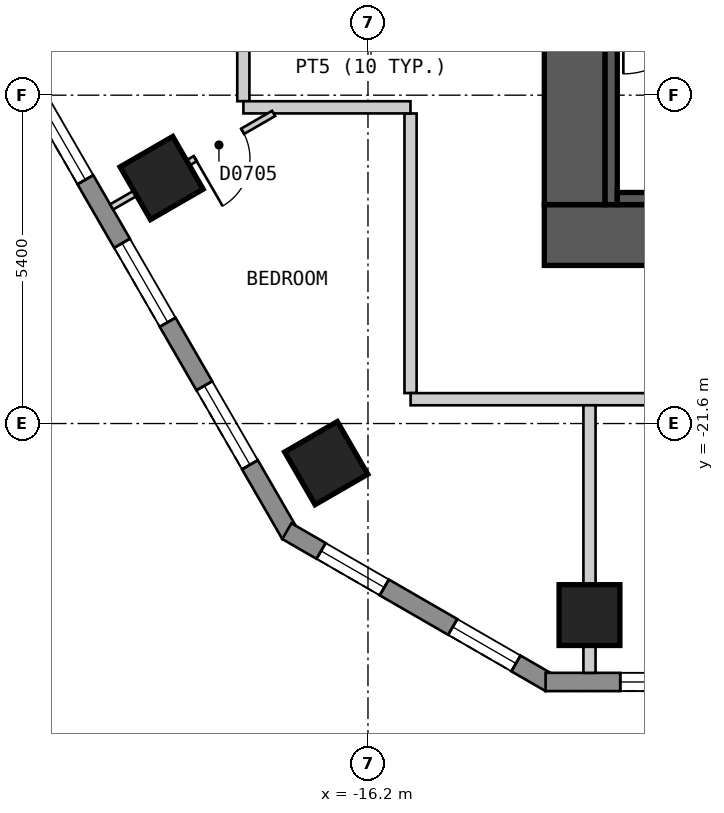
"""IFC4 building model, lengths in metres.
Left out: names, types, materials, properties, quantities, classifications, styles, units other than length and angle.
Written with IfcOpenShell. Run it as: python <this file> out.ifc"""

import sys

from ifc_helpers import new_model, si_unit, direction, frame, frame_2d, origin, origin_2d, place, context, subcontext, project, spatial, polyline, rectangle, outline, extrude, element, fill, save


model = new_model("IFC4")
c1 = context("Model", 3, precision=1e-05, world=origin(), true_north=direction((0.0, 1.0)))
c2 = subcontext(c1, "Body", "Model", "MODEL_VIEW")
j1 = project(units=[si_unit("LENGTHUNIT", "METRE"), si_unit("PLANEANGLEUNIT", "RADIAN")], contexts=[c1])
p1 = place(None, origin())
s1 = spatial("IfcSite", under=j1, at=p1, CompositionType="ELEMENT")
p2 = place(p1, origin())
s2 = spatial("IfcBuilding", under=s1, at=p2, CompositionType="ELEMENT")
p3 = place(p2, frame((0.0, 0.0, 93.0)))
s3 = spatial("IfcBuildingStorey", under=s2, at=p3, CompositionType="ELEMENT", Elevation=93.0)
for number, where, z_axis, x_axis in (
    (1, (-19.594, -17.563, 0.0), (0.0, 0.0, 1.0), (0.5, -0.866, 0.0)),
    (2, (-16.887, -22.251, 0.0), (0.0, 0.0, 1.0), (0.5, -0.866, 0.0)),
    (3, (-12.557, -24.75, 0.0), (0.0, 0.0, 1.0), (1.0, 0.0, 0.0)),
):
    element("IfcColumn", number, at=place(p3, frame(where, z_axis=z_axis, x_axis=x_axis)), inside=s3, PredefinedType="COLUMN", context=c2, shape_type="SweptSolid", body=[
        extrude(rectangle(XDim=1.0, YDim=1.0, at=origin_2d()), origin(), (0.0, 0.0, 1.0), 3.0),
    ])
p4 = place(p3, frame((-13.3, -18.5, 0.0), z_axis=(0.0, 0.0, 1.0), x_axis=(1.0, 0.0, 0.0)))
e4 = element("IfcWall", 4, at=p4, inside=s3, PredefinedType="SHEAR", context=c2, shape_type="SweptSolid", body=[
    extrude(rectangle(XDim=26.6, YDim=1.0, at=frame_2d((13.3, 0.0))), origin(), (0.0, 0.0, 1.0), 2.7),
])
p5 = place(p3, frame((-12.8, -18.0, 0.0), z_axis=(0.0, 0.0, 1.0), x_axis=(0.0, 1.0, 0.0)))
e5 = element("IfcWall", 5, at=p5, inside=s3, PredefinedType="SHEAR", context=c2, shape_type="SweptSolid", body=[
    extrude(rectangle(XDim=12.0, YDim=1.0, at=frame_2d((6.0, 0.0))), origin(), (0.0, 0.0, 1.0), 2.7),
])
p6 = place(p5, frame((3.8, 0.0, 0.0)))
e6 = element("IfcOpeningElement", 6, at=p6, cuts=e5, PredefinedType="OPENING", context=c2, shape_type="SweptSolid", body=[
    extrude(rectangle(XDim=1.2, YDim=2.1, at=frame_2d((0.6, 1.05))), frame((0.0, 0.51, 0.0), z_axis=(0.0, -1.0, 0.0), x_axis=(1.0, 0.0, 0.0)), (0.0, 0.0, 1.0), 1.02),
])
p7 = place(p3, frame((-29.027, -3.425, 0.0), z_axis=(0.0, 0.0, 1.0), x_axis=(0.500035407905, -0.866004960056, 0.0)))
e7 = element("IfcWall", 7, at=p7, inside=s3, PredefinedType="SOLIDWALL", context=c2, shape_type="SweptSolid", body=[
    extrude(outline(polyline([(0.0, -0.15), (23.094, -0.15), (23.014, 0.15), (0.08, 0.15), (0.0, -0.15)])), origin(), (0.0, 0.0, 1.0), 2.7),
])
p8 = place(p7, frame((1.324, 0.0, 0.15)))
e8 = element("IfcOpeningElement", 8, at=p8, cuts=e7, PredefinedType="OPENING", context=c2, shape_type="SweptSolid", body=[
    extrude(rectangle(XDim=1.5, YDim=2.1, at=frame_2d((0.75, 1.05))), frame((0.0, 0.16, 0.0), z_axis=(0.0, -1.0, 0.0), x_axis=(1.0, 0.0, 0.0)), (0.0, 0.0, 1.0), 0.32),
])
p9 = place(p7, frame((4.031, 0.0, 0.15)))
e9 = element("IfcOpeningElement", 9, at=p9, cuts=e7, PredefinedType="OPENING", context=c2, shape_type="SweptSolid", body=[
    extrude(rectangle(XDim=1.5, YDim=2.1, at=frame_2d((0.75, 1.05))), frame((0.0, 0.16, 0.0), z_axis=(0.0, -1.0, 0.0), x_axis=(1.0, 0.0, 0.0)), (0.0, 0.0, 1.0), 0.32),
])
p10 = place(p7, frame((6.737, 0.0, 0.15)))
e10 = element("IfcOpeningElement", 10, at=p10, cuts=e7, PredefinedType="OPENING", context=c2, shape_type="SweptSolid", body=[
    extrude(rectangle(XDim=1.5, YDim=2.1, at=frame_2d((0.75, 1.05))), frame((0.0, 0.16, 0.0), z_axis=(0.0, -1.0, 0.0), x_axis=(1.0, 0.0, 0.0)), (0.0, 0.0, 1.0), 0.32),
])
p11 = place(p7, frame((9.444, 0.0, 0.15)))
e11 = element("IfcOpeningElement", 11, at=p11, cuts=e7, PredefinedType="OPENING", context=c2, shape_type="SweptSolid", body=[
    extrude(rectangle(XDim=1.5, YDim=2.1, at=frame_2d((0.75, 1.05))), frame((0.0, 0.16, 0.0), z_axis=(0.0, -1.0, 0.0), x_axis=(1.0, 0.0, 0.0)), (0.0, 0.0, 1.0), 0.32),
])
p12 = place(p7, frame((12.151, 0.0, 0.15)))
e12 = element("IfcOpeningElement", 12, at=p12, cuts=e7, PredefinedType="OPENING", context=c2, shape_type="SweptSolid", body=[
    extrude(rectangle(XDim=1.5, YDim=2.1, at=frame_2d((0.75, 1.05))), frame((0.0, 0.16, 0.0), z_axis=(0.0, -1.0, 0.0), x_axis=(1.0, 0.0, 0.0)), (0.0, 0.0, 1.0), 0.32),
])
p13 = place(p7, frame((14.857, 0.0, 0.15)))
e13 = element("IfcOpeningElement", 13, at=p13, cuts=e7, PredefinedType="OPENING", context=c2, shape_type="SweptSolid", body=[
    extrude(rectangle(XDim=1.5, YDim=2.1, at=frame_2d((0.75, 1.05))), frame((0.0, 0.16, 0.0), z_axis=(0.0, -1.0, 0.0), x_axis=(1.0, 0.0, 0.0)), (0.0, 0.0, 1.0), 0.32),
])
p14 = place(p7, frame((17.564, 0.0, 0.15)))
e14 = element("IfcOpeningElement", 14, at=p14, cuts=e7, PredefinedType="OPENING", context=c2, shape_type="SweptSolid", body=[
    extrude(rectangle(XDim=1.5, YDim=2.1, at=frame_2d((0.75, 1.05))), frame((0.0, 0.16, 0.0), z_axis=(0.0, -1.0, 0.0), x_axis=(1.0, 0.0, 0.0)), (0.0, 0.0, 1.0), 0.32),
])
p15 = place(p7, frame((20.27, 0.0, 0.15)))
e15 = element("IfcOpeningElement", 15, at=p15, cuts=e7, PredefinedType="OPENING", context=c2, shape_type="SweptSolid", body=[
    extrude(rectangle(XDim=1.5, YDim=2.1, at=frame_2d((0.75, 1.05))), frame((0.0, 0.16, 0.0), z_axis=(0.0, -1.0, 0.0), x_axis=(1.0, 0.0, 0.0)), (0.0, 0.0, 1.0), 0.32),
])
p16 = place(p3, frame((-17.534, -23.37, 0.0), z_axis=(0.0, 0.0, 1.0), x_axis=(0.866010750942, -0.50002537861, 0.0)))
e16 = element("IfcWall", 16, at=p16, inside=s3, PredefinedType="SOLIDWALL", context=c2, shape_type="SweptSolid", body=[
    extrude(outline(polyline([(0.0, -0.15), (5.0, -0.15), (4.919, 0.15), (0.08, 0.15), (0.0, -0.15)])), origin(), (0.0, 0.0, 1.0), 2.7),
])
p17 = place(p16, frame((0.65, 0.0, 0.15)))
e17 = element("IfcOpeningElement", 17, at=p17, cuts=e16, PredefinedType="OPENING", context=c2, shape_type="SweptSolid", body=[
    extrude(rectangle(XDim=1.2, YDim=2.1, at=frame_2d((0.6, 1.05))), frame((0.0, 0.16, 0.0), z_axis=(0.0, -1.0, 0.0), x_axis=(1.0, 0.0, 0.0)), (0.0, 0.0, 1.0), 0.32),
])
p18 = place(p16, frame((3.15, 0.0, 0.15)))
e18 = element("IfcOpeningElement", 18, at=p18, cuts=e16, PredefinedType="OPENING", context=c2, shape_type="SweptSolid", body=[
    extrude(rectangle(XDim=1.2, YDim=2.1, at=frame_2d((0.6, 1.05))), frame((0.0, 0.16, 0.0), z_axis=(0.0, -1.0, 0.0), x_axis=(1.0, 0.0, 0.0)), (0.0, 0.0, 1.0), 0.32),
])
p19 = place(p3, frame((-13.279, -25.85, 0.0), z_axis=(0.0, 0.0, 1.0), x_axis=(1.0, 0.0, 0.0)))
e19 = element("IfcWall", 19, at=p19, inside=s3, PredefinedType="SOLIDWALL", context=c2, shape_type="SweptSolid", body=[
    extrude(outline(polyline([(0.0, -0.15), (26.558, -0.15), (26.478, 0.15), (0.08, 0.15), (0.0, -0.15)])), origin(), (0.0, 0.0, 1.0), 2.7),
])
p20 = place(p19, frame((1.228, 0.0, 0.15)))
e20 = element("IfcOpeningElement", 20, at=p20, cuts=e19, PredefinedType="OPENING", context=c2, shape_type="SweptSolid", body=[
    extrude(rectangle(XDim=1.5, YDim=2.1, at=frame_2d((0.75, 1.05))), frame((0.0, 0.16, 0.0), z_axis=(0.0, -1.0, 0.0), x_axis=(1.0, 0.0, 0.0)), (0.0, 0.0, 1.0), 0.32),
])
p21 = place(p19, frame((3.739, 0.0, 0.15)))
e21 = element("IfcOpeningElement", 21, at=p21, cuts=e19, PredefinedType="OPENING", context=c2, shape_type="SweptSolid", body=[
    extrude(rectangle(XDim=1.5, YDim=2.1, at=frame_2d((0.75, 1.05))), frame((0.0, 0.16, 0.0), z_axis=(0.0, -1.0, 0.0), x_axis=(1.0, 0.0, 0.0)), (0.0, 0.0, 1.0), 0.32),
])
p22 = place(p19, frame((6.251, 0.0, 0.15)))
e22 = element("IfcOpeningElement", 22, at=p22, cuts=e19, PredefinedType="OPENING", context=c2, shape_type="SweptSolid", body=[
    extrude(rectangle(XDim=1.5, YDim=2.1, at=frame_2d((0.75, 1.05))), frame((0.0, 0.16, 0.0), z_axis=(0.0, -1.0, 0.0), x_axis=(1.0, 0.0, 0.0)), (0.0, 0.0, 1.0), 0.32),
])
p23 = place(p19, frame((8.762, 0.0, 0.15)))
e23 = element("IfcOpeningElement", 23, at=p23, cuts=e19, PredefinedType="OPENING", context=c2, shape_type="SweptSolid", body=[
    extrude(rectangle(XDim=1.5, YDim=2.1, at=frame_2d((0.75, 1.05))), frame((0.0, 0.16, 0.0), z_axis=(0.0, -1.0, 0.0), x_axis=(1.0, 0.0, 0.0)), (0.0, 0.0, 1.0), 0.32),
])
p24 = place(p19, frame((11.274, 0.0, 0.15)))
e24 = element("IfcOpeningElement", 24, at=p24, cuts=e19, PredefinedType="OPENING", context=c2, shape_type="SweptSolid", body=[
    extrude(rectangle(XDim=1.5, YDim=2.1, at=frame_2d((0.75, 1.05))), frame((0.0, 0.16, 0.0), z_axis=(0.0, -1.0, 0.0), x_axis=(1.0, 0.0, 0.0)), (0.0, 0.0, 1.0), 0.32),
])
p25 = place(p19, frame((13.785, 0.0, 0.15)))
e25 = element("IfcOpeningElement", 25, at=p25, cuts=e19, PredefinedType="OPENING", context=c2, shape_type="SweptSolid", body=[
    extrude(rectangle(XDim=1.5, YDim=2.1, at=frame_2d((0.75, 1.05))), frame((0.0, 0.16, 0.0), z_axis=(0.0, -1.0, 0.0), x_axis=(1.0, 0.0, 0.0)), (0.0, 0.0, 1.0), 0.32),
])
p26 = place(p19, frame((16.297, 0.0, 0.15)))
e26 = element("IfcOpeningElement", 26, at=p26, cuts=e19, PredefinedType="OPENING", context=c2, shape_type="SweptSolid", body=[
    extrude(rectangle(XDim=1.5, YDim=2.1, at=frame_2d((0.75, 1.05))), frame((0.0, 0.16, 0.0), z_axis=(0.0, -1.0, 0.0), x_axis=(1.0, 0.0, 0.0)), (0.0, 0.0, 1.0), 0.32),
])
p27 = place(p19, frame((18.808, 0.0, 0.15)))
e27 = element("IfcOpeningElement", 27, at=p27, cuts=e19, PredefinedType="OPENING", context=c2, shape_type="SweptSolid", body=[
    extrude(rectangle(XDim=1.5, YDim=2.1, at=frame_2d((0.75, 1.05))), frame((0.0, 0.16, 0.0), z_axis=(0.0, -1.0, 0.0), x_axis=(1.0, 0.0, 0.0)), (0.0, 0.0, 1.0), 0.32),
])
p28 = place(p19, frame((21.32, 0.0, 0.15)))
e28 = element("IfcOpeningElement", 28, at=p28, cuts=e19, PredefinedType="OPENING", context=c2, shape_type="SweptSolid", body=[
    extrude(rectangle(XDim=1.5, YDim=2.1, at=frame_2d((0.75, 1.05))), frame((0.0, 0.16, 0.0), z_axis=(0.0, -1.0, 0.0), x_axis=(1.0, 0.0, 0.0)), (0.0, 0.0, 1.0), 0.32),
])
p29 = place(p19, frame((23.831, 0.0, 0.15)))
e29 = element("IfcOpeningElement", 29, at=p29, cuts=e19, PredefinedType="OPENING", context=c2, shape_type="SweptSolid", body=[
    extrude(rectangle(XDim=1.5, YDim=2.1, at=frame_2d((0.75, 1.05))), frame((0.0, 0.16, 0.0), z_axis=(0.0, -1.0, 0.0), x_axis=(1.0, 0.0, 0.0)), (0.0, 0.0, 1.0), 0.32),
])
p30 = place(p3, frame((-15.5, -16.501, 0.0), z_axis=(0.0, 0.0, 1.0), x_axis=(0.0, -1.0, 0.0)))
e30 = element("IfcWall", 30, at=p30, inside=s3, PredefinedType="PARTITIONING", context=c2, shape_type="SweptSolid", body=[
    extrude(rectangle(XDim=4.598, YDim=0.2, at=frame_2d((2.299, 0.0))), origin(), (0.0, 0.0, 1.0), 2.7),
])
p31 = place(p3, frame((-18.25, -10.594, 0.0), z_axis=(0.0, 0.0, 1.0), x_axis=(0.0, -1.0, 0.0)))
e31 = element("IfcWall", 31, at=p31, inside=s3, PredefinedType="PARTITIONING", context=c2, shape_type="SweptSolid", body=[
    extrude(rectangle(XDim=5.705, YDim=0.2, at=frame_2d((2.853, 0.0))), origin(), (0.0, 0.0, 1.0), 2.7),
])
p32 = place(p3, frame((-18.249, -16.4, 0.0), z_axis=(0.0, 0.0, 1.0), x_axis=(1.0, 0.0, 0.0)))
e32 = element("IfcWall", 32, at=p32, inside=s3, PredefinedType="PARTITIONING", context=c2, shape_type="SweptSolid", body=[
    extrude(rectangle(XDim=2.748, YDim=0.2, at=frame_2d((1.374, 0.0))), origin(), (0.0, 0.0, 1.0), 2.7),
])
p33 = place(p3, frame((-15.499, -21.2, 0.0), z_axis=(0.0, 0.0, 1.0), x_axis=(1.0, 0.0, 0.0)))
e33 = element("IfcWall", 33, at=p33, inside=s3, PredefinedType="PARTITIONING", context=c2, shape_type="SweptSolid", body=[
    extrude(rectangle(XDim=30.898, YDim=0.2, at=frame_2d((15.449, 0.0))), origin(), (0.0, 0.0, 1.0), 2.7),
])
p34 = place(p33, frame((9.977, 0.0, 0.0)))
e34 = element("IfcOpeningElement", 34, at=p34, cuts=e33, PredefinedType="OPENING", context=c2, shape_type="SweptSolid", body=[
    extrude(rectangle(XDim=1.0, YDim=2.1, at=frame_2d((0.5, 1.05))), frame((0.0, 0.11, 0.0), z_axis=(0.0, -1.0, 0.0), x_axis=(1.0, 0.0, 0.0)), (0.0, 0.0, 1.0), 0.22),
])
p35 = place(p33, frame((25.046, 0.0, 0.0)))
e35 = element("IfcOpeningElement", 35, at=p35, cuts=e33, PredefinedType="OPENING", context=c2, shape_type="SweptSolid", body=[
    extrude(rectangle(XDim=1.0, YDim=2.1, at=frame_2d((0.5, 1.05))), frame((0.0, 0.11, 0.0), z_axis=(0.0, -1.0, 0.0), x_axis=(1.0, 0.0, 0.0)), (0.0, 0.0, 1.0), 0.22),
])
p36 = place(p3, frame((-20.416, -18.038, 0.0), z_axis=(0.0, 0.0, 1.0), x_axis=(0.866026989333, 0.499997253739, 0.0)))
e36 = element("IfcWall", 36, at=p36, inside=s3, PredefinedType="PARTITIONING", context=c2, shape_type="SweptSolid", body=[
    extrude(rectangle(XDim=3.076, YDim=0.1, at=frame_2d((1.538, 0.0))), origin(), (0.0, 0.0, 1.0), 2.7),
])
p37 = place(p36, frame((1.588, 0.0, 0.0)))
e37 = element("IfcOpeningElement", 37, at=p37, cuts=e36, PredefinedType="OPENING", context=c2, shape_type="SweptSolid", body=[
    extrude(rectangle(XDim=0.9, YDim=2.1, at=frame_2d((0.45, 1.05))), frame((0.0, 0.06, 0.0), z_axis=(0.0, -1.0, 0.0), x_axis=(1.0, 0.0, 0.0)), (0.0, 0.0, 1.0), 0.12),
])
p38 = place(p3, frame((-12.557, -25.7, 0.0), z_axis=(0.0, 0.0, 1.0), x_axis=(0.0, 1.0, 0.0)))
e38 = element("IfcWall", 38, at=p38, inside=s3, PredefinedType="PARTITIONING", context=c2, shape_type="SweptSolid", body=[
    extrude(rectangle(XDim=4.4, YDim=0.2, at=frame_2d((2.2, 0.0))), origin(), (0.0, 0.0, 1.0), 2.7),
])
p39 = place(p3, frame((-12.2, -18.0, 0.0), z_axis=(0.0, 0.0, 1.0), x_axis=(0.0, 1.0, 0.0)))
e39 = element("IfcWall", 39, at=p39, inside=s3, PredefinedType="SOLIDWALL", context=c2, shape_type="SweptSolid", body=[
    extrude(rectangle(XDim=3.15, YDim=0.2, at=frame_2d((1.575, 0.0))), origin(), (0.0, 0.0, 1.0), 2.7),
])
p40 = place(p3, frame((-12.1, -17.9, 0.0), z_axis=(0.0, 0.0, 1.0), x_axis=(1.0, 0.0, 0.0)))
e40 = element("IfcWall", 40, at=p40, inside=s3, PredefinedType="SOLIDWALL", context=c2, shape_type="SweptSolid", body=[
    extrude(rectangle(XDim=5.4, YDim=0.2, at=frame_2d((2.7, 0.0))), origin(), (0.0, 0.0, 1.0), 2.7),
])
p41 = place(p13, origin())
e41 = element("IfcWindow", 41, at=p41, inside=s3, PartitioningType="SINGLE_PANEL", PredefinedType="WINDOW", context=c2, shape_type="SweptSolid", body=[
    extrude(rectangle(XDim=1.5, YDim=2.1, at=frame_2d((0.75, 1.05))), frame((0.0, 0.03, 0.0), z_axis=(0.0, -1.0, 0.0), x_axis=(1.0, 0.0, 0.0)), (0.0, 0.0, 1.0), 0.06),
])
fill(e13, e41)
p42 = place(p14, origin())
e42 = element("IfcWindow", 42, at=p42, inside=s3, PartitioningType="SINGLE_PANEL", PredefinedType="WINDOW", context=c2, shape_type="SweptSolid", body=[
    extrude(rectangle(XDim=1.5, YDim=2.1, at=frame_2d((0.75, 1.05))), frame((0.0, 0.03, 0.0), z_axis=(0.0, -1.0, 0.0), x_axis=(1.0, 0.0, 0.0)), (0.0, 0.0, 1.0), 0.06),
])
fill(e14, e42)
p43 = place(p15, origin())
e43 = element("IfcWindow", 43, at=p43, inside=s3, PartitioningType="SINGLE_PANEL", PredefinedType="WINDOW", context=c2, shape_type="SweptSolid", body=[
    extrude(rectangle(XDim=1.5, YDim=2.1, at=frame_2d((0.75, 1.05))), frame((0.0, 0.03, 0.0), z_axis=(0.0, -1.0, 0.0), x_axis=(1.0, 0.0, 0.0)), (0.0, 0.0, 1.0), 0.06),
])
fill(e15, e43)
p44 = place(p17, origin())
e44 = element("IfcWindow", 44, at=p44, inside=s3, PartitioningType="SINGLE_PANEL", PredefinedType="WINDOW", context=c2, shape_type="SweptSolid", body=[
    extrude(rectangle(XDim=1.2, YDim=2.1, at=frame_2d((0.6, 1.05))), frame((0.0, 0.03, 0.0), z_axis=(0.0, -1.0, 0.0), x_axis=(1.0, 0.0, 0.0)), (0.0, 0.0, 1.0), 0.06),
])
fill(e17, e44)
p45 = place(p18, origin())
e45 = element("IfcWindow", 45, at=p45, inside=s3, PartitioningType="SINGLE_PANEL", PredefinedType="WINDOW", context=c2, shape_type="SweptSolid", body=[
    extrude(rectangle(XDim=1.2, YDim=2.1, at=frame_2d((0.6, 1.05))), frame((0.0, 0.03, 0.0), z_axis=(0.0, -1.0, 0.0), x_axis=(1.0, 0.0, 0.0)), (0.0, 0.0, 1.0), 0.06),
])
fill(e18, e45)
p46 = place(p20, origin())
e46 = element("IfcWindow", 46, at=p46, inside=s3, PartitioningType="SINGLE_PANEL", PredefinedType="WINDOW", context=c2, shape_type="SweptSolid", body=[
    extrude(rectangle(XDim=1.5, YDim=2.1, at=frame_2d((0.75, 1.05))), frame((0.0, 0.03, 0.0), z_axis=(0.0, -1.0, 0.0), x_axis=(1.0, 0.0, 0.0)), (0.0, 0.0, 1.0), 0.06),
])
fill(e20, e46)
p47 = place(p37, origin())
e47 = element("IfcDoor", 47, at=p47, inside=s3, OperationType="SINGLE_SWING_LEFT", PredefinedType="DOOR", context=c2, shape_type="SweptSolid", body=[
    extrude(rectangle(XDim=0.9, YDim=2.1, at=frame_2d((0.45, 1.05))), frame((0.0, 0.025, 0.0), z_axis=(0.0, -1.0, 0.0), x_axis=(1.0, 0.0, 0.0)), (0.0, 0.0, 1.0), 0.05),
])
fill(e37, e47)
save(model, sys.argv[1])
